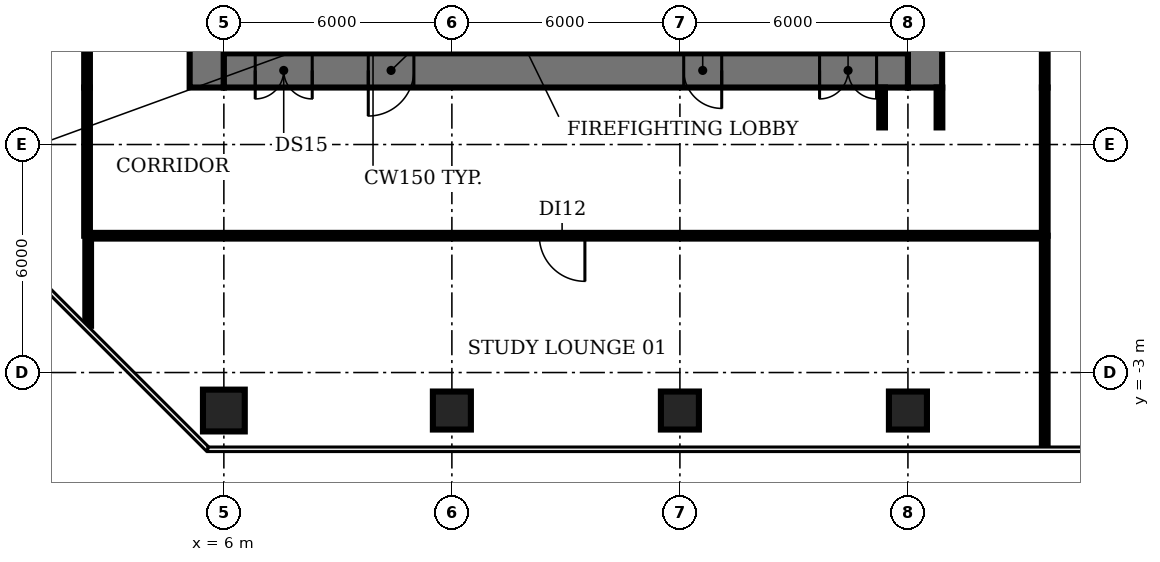
"""IFC4 building model, lengths in metres.
Left out: names, types, materials, properties, quantities, classifications, styles, units other than length and angle.
Written with IfcOpenShell. Run it as: python <this file> out.ifc"""

import sys

from ifc_helpers import new_model, si_unit, direction, frame, frame_2d, origin, origin_2d, place, context, subcontext, project, spatial, rectangle, circle, extrude, element, fill, save


model = new_model("IFC4")
c1 = context("Model", 3, precision=1e-05, world=origin(), true_north=direction((0.0, 1.0)))
c2 = subcontext(c1, "Body", "Model", "MODEL_VIEW")
j1 = project(units=[si_unit("LENGTHUNIT", "METRE"), si_unit("PLANEANGLEUNIT", "RADIAN")], contexts=[c1])
p1 = place(None, origin())
s1 = spatial("IfcSite", under=j1, at=p1, CompositionType="ELEMENT")
p2 = place(p1, origin())
s2 = spatial("IfcBuilding", under=s1, at=p2, CompositionType="ELEMENT")
p3 = place(p2, frame((0.0, 0.0, 24.5)))
s3 = spatial("IfcBuildingStorey", under=s2, at=p3, CompositionType="ELEMENT", Elevation=24.5)
p4 = place(p3, frame((6.0, -4.0, 0.0), z_axis=(0.0, 0.0, 1.0), x_axis=(1.0, 0.0, 0.0)))
e1 = element("IfcColumn", 1, at=p4, inside=s3, PredefinedType="COLUMN", context=c2, shape_type="SweptSolid", body=[
    extrude(circle(Radius=0.55, at=origin_2d()), origin(), (0.0, 0.0, 1.0), 4.15),
])
for number, where, z_axis, x_axis in (
    (2, (12.0, -4.0, 0.0), (0.0, 0.0, 1.0), (1.0, 0.0, 0.0)),
    (3, (18.0, -4.0, 0.0), (0.0, 0.0, 1.0), (1.0, 0.0, 0.0)),
    (4, (24.0, -4.0, 0.0), (0.0, 0.0, 1.0), (1.0, 0.0, 0.0)),
):
    element("IfcColumn", number, at=place(p3, frame(where, z_axis=z_axis, x_axis=x_axis)), inside=s3, PredefinedType="COLUMN", context=c2, shape_type="SweptSolid", body=[
        extrude(rectangle(XDim=1.0, YDim=1.0, at=origin_2d()), origin(), (0.0, 0.0, 1.0), 4.15),
    ])
p5 = place(p3, frame((9.275, 11.825, 0.0), z_axis=(0.0, 0.0, 1.0), x_axis=(0.0, -1.0, 0.0)))
e5 = element("IfcWall", 5, at=p5, inside=s3, PredefinedType="SHEAR", context=c2, shape_type="SweptSolid", body=[
    extrude(rectangle(XDim=6.425, YDim=0.25, at=frame_2d((3.212, 0.0))), origin(), (0.0, 0.0, 1.0), 4.15),
])
p6 = place(p5, frame((5.075, 0.0, 0.0)))
e6 = element("IfcOpeningElement", 6, at=p6, cuts=e5, PredefinedType="OPENING", context=c2, shape_type="SweptSolid", body=[
    extrude(rectangle(XDim=1.0, YDim=2.1, at=frame_2d((0.5, 1.05))), frame((0.0, 0.135, 0.0), z_axis=(0.0, -1.0, 0.0), x_axis=(1.0, 0.0, 0.0)), (0.0, 0.0, 1.0), 0.27),
])
p7 = place(p3, frame((13.5, 5.4, 0.0), z_axis=(0.0, 0.0, 1.0), x_axis=(0.0, 1.0, 0.0)))
e7 = element("IfcWall", 7, at=p7, inside=s3, PredefinedType="SHEAR", context=c2, shape_type="SweptSolid", body=[
    extrude(rectangle(XDim=8.2, YDim=0.2, at=frame_2d((4.1, 0.0))), origin(), (0.0, 0.0, 1.0), 4.15),
])
p8 = place(p7, frame((0.75, 0.0, 0.0)))
e8 = element("IfcOpeningElement", 8, at=p8, cuts=e7, PredefinedType="OPENING", context=c2, shape_type="SweptSolid", body=[
    extrude(rectangle(XDim=1.1, YDim=2.1, at=frame_2d((0.55, 1.05))), frame((0.0, 0.11, 0.0), z_axis=(0.0, -1.0, 0.0), x_axis=(1.0, 0.0, 0.0)), (0.0, 0.0, 1.0), 0.22),
])
p9 = place(p7, frame((3.55, 0.0, 0.0)))
e9 = element("IfcOpeningElement", 9, at=p9, cuts=e7, PredefinedType="OPENING", context=c2, shape_type="SweptSolid", body=[
    extrude(rectangle(XDim=1.1, YDim=2.1, at=frame_2d((0.55, 1.05))), frame((0.0, 0.11, 0.0), z_axis=(0.0, -1.0, 0.0), x_axis=(1.0, 0.0, 0.0)), (0.0, 0.0, 1.0), 0.22),
])
p10 = place(p7, frame((6.35, 0.0, 0.0)))
e10 = element("IfcOpeningElement", 10, at=p10, cuts=e7, PredefinedType="OPENING", context=c2, shape_type="SweptSolid", body=[
    extrude(rectangle(XDim=1.1, YDim=2.1, at=frame_2d((0.55, 1.05))), frame((0.0, 0.11, 0.0), z_axis=(0.0, -1.0, 0.0), x_axis=(1.0, 0.0, 0.0)), (0.0, 0.0, 1.0), 0.22),
])
p11 = place(p3, frame((16.5, 5.4, 0.0), z_axis=(0.0, 0.0, 1.0), x_axis=(0.0, 1.0, 0.0)))
e11 = element("IfcWall", 11, at=p11, inside=s3, PredefinedType="SHEAR", context=c2, shape_type="SweptSolid", body=[
    extrude(rectangle(XDim=8.2, YDim=0.2, at=frame_2d((4.1, 0.0))), origin(), (0.0, 0.0, 1.0), 4.15),
])
p12 = place(p3, frame((20.725, 5.4, 0.0), z_axis=(0.0, 0.0, 1.0), x_axis=(0.0, 1.0, 0.0)))
e12 = element("IfcWall", 12, at=p12, inside=s3, PredefinedType="SHEAR", context=c2, shape_type="SweptSolid", body=[
    extrude(rectangle(XDim=6.3, YDim=0.25, at=frame_2d((3.15, 0.0))), origin(), (0.0, 0.0, 1.0), 4.15),
])
p13 = place(p3, frame((5.55, 4.5, 0.0), z_axis=(0.0, 0.0, 1.0), x_axis=(0.0, 1.0, 0.0)))
e13 = element("IfcWall", 13, at=p13, inside=s3, PredefinedType="SHEAR", context=c2, shape_type="SweptSolid", body=[
    extrude(rectangle(XDim=21.2, YDim=0.9, at=frame_2d((10.6, 0.0))), origin(), (0.0, 0.0, 1.0), 4.15),
])
p14 = place(p13, frame((7.6, 0.0, 0.0)))
e14 = element("IfcOpeningElement", 14, at=p14, cuts=e13, PredefinedType="OPENING", context=c2, shape_type="SweptSolid", body=[
    extrude(rectangle(XDim=1.2, YDim=2.1, at=frame_2d((0.6, 1.05))), frame((0.0, 0.46, 0.0), z_axis=(0.0, -1.0, 0.0), x_axis=(1.0, 0.0, 0.0)), (0.0, 0.0, 1.0), 0.92),
])
p15 = place(p13, frame((14.15, 0.0, 0.0)))
e15 = element("IfcOpeningElement", 15, at=p15, cuts=e13, PredefinedType="OPENING", context=c2, shape_type="SweptSolid", body=[
    extrude(rectangle(XDim=1.2, YDim=2.1, at=frame_2d((0.6, 1.05))), frame((0.0, 0.46, 0.0), z_axis=(0.0, -1.0, 0.0), x_axis=(1.0, 0.0, 0.0)), (0.0, 0.0, 1.0), 0.92),
])
p16 = place(p3, frame((24.45, 25.7, 0.0), z_axis=(0.0, 0.0, 1.0), x_axis=(0.0, -1.0, 0.0)))
e16 = element("IfcWall", 16, at=p16, inside=s3, PredefinedType="SHEAR", context=c2, shape_type="SweptSolid", body=[
    extrude(rectangle(XDim=21.2, YDim=0.9, at=frame_2d((10.6, 0.0))), origin(), (0.0, 0.0, 1.0), 4.15),
])
p17 = place(p16, frame((12.45, 0.0, 0.0)))
e17 = element("IfcOpeningElement", 17, at=p17, cuts=e16, PredefinedType="OPENING", context=c2, shape_type="SweptSolid", body=[
    extrude(rectangle(XDim=0.9, YDim=2.1, at=frame_2d((0.45, 1.05))), frame((0.0, 0.46, 0.0), z_axis=(0.0, -1.0, 0.0), x_axis=(1.0, 0.0, 0.0)), (0.0, 0.0, 1.0), 0.92),
])
p18 = place(p16, frame((6.45, 0.0, 0.0)))
e18 = element("IfcOpeningElement", 18, at=p18, cuts=e16, PredefinedType="OPENING", context=c2, shape_type="SweptSolid", body=[
    extrude(rectangle(XDim=2.0, YDim=2.1, at=frame_2d((1.0, 1.05))), frame((0.0, 0.46, 0.0), z_axis=(0.0, -1.0, 0.0), x_axis=(1.0, 0.0, 0.0)), (0.0, 0.0, 1.0), 0.92),
])
p19 = place(p3, frame((24.0, 4.95, 0.0), z_axis=(0.0, 0.0, 1.0), x_axis=(-1.0, 0.0, 0.0)))
e19 = element("IfcWall", 19, at=p19, inside=s3, PredefinedType="SHEAR", context=c2, shape_type="SweptSolid", body=[
    extrude(rectangle(XDim=18.0, YDim=0.9, at=frame_2d((9.0, 0.0))), origin(), (0.0, 0.0, 1.0), 4.15),
])
p20 = place(p19, frame((15.675, 0.0, 0.0)))
e20 = element("IfcOpeningElement", 20, at=p20, cuts=e19, PredefinedType="OPENING", context=c2, shape_type="SweptSolid", body=[
    extrude(rectangle(XDim=1.5, YDim=2.1, at=frame_2d((0.75, 1.05))), frame((0.0, 0.46, 0.0), z_axis=(0.0, -1.0, 0.0), x_axis=(1.0, 0.0, 0.0)), (0.0, 0.0, 1.0), 0.92),
])
p21 = place(p19, frame((0.825, 0.0, 0.0)))
e21 = element("IfcOpeningElement", 21, at=p21, cuts=e19, PredefinedType="OPENING", context=c2, shape_type="SweptSolid", body=[
    extrude(rectangle(XDim=1.5, YDim=2.1, at=frame_2d((0.75, 1.05))), frame((0.0, 0.46, 0.0), z_axis=(0.0, -1.0, 0.0), x_axis=(1.0, 0.0, 0.0)), (0.0, 0.0, 1.0), 0.92),
])
p22 = place(p19, frame((13.0, 0.0, 0.0)))
e22 = element("IfcOpeningElement", 22, at=p22, cuts=e19, PredefinedType="OPENING", context=c2, shape_type="SweptSolid", body=[
    extrude(rectangle(XDim=1.2, YDim=2.1, at=frame_2d((0.6, 1.05))), frame((0.0, 0.46, 0.0), z_axis=(0.0, -1.0, 0.0), x_axis=(1.0, 0.0, 0.0)), (0.0, 0.0, 1.0), 0.92),
])
p23 = place(p19, frame((4.9, 0.0, 0.0)))
e23 = element("IfcOpeningElement", 23, at=p23, cuts=e19, PredefinedType="OPENING", context=c2, shape_type="SweptSolid", body=[
    extrude(rectangle(XDim=1.0, YDim=2.1, at=frame_2d((0.5, 1.05))), frame((0.0, 0.46, 0.0), z_axis=(0.0, -1.0, 0.0), x_axis=(1.0, 0.0, 0.0)), (0.0, 0.0, 1.0), 0.92),
])
p24 = place(p3, frame((2.4, 0.6, 0.0), z_axis=(0.0, 0.0, 1.0), x_axis=(0.0, 1.0, 0.0)))
e24 = element("IfcWall", 24, at=p24, inside=s3, PredefinedType="PARTITIONING", context=c2, shape_type="SweptSolid", body=[
    extrude(rectangle(XDim=3.9, YDim=0.15, at=frame_2d((1.95, 0.0))), origin(), (0.0, 0.0, 1.0), 3.08),
])
p25 = place(p3, frame((2.4, 4.5, 0.0), z_axis=(0.0, 0.0, 1.0), x_axis=(0.0, 1.0, 0.0)))
e25 = element("IfcWall", 25, at=p25, inside=s3, PredefinedType="PARTITIONING", context=c2, shape_type="SweptSolid", body=[
    extrude(rectangle(XDim=21.2, YDim=0.15, at=frame_2d((10.6, 0.0))), origin(), (0.0, 0.0, 1.0), 3.08),
])
p26 = place(p25, frame((10.8, 0.0, 0.0)))
e26 = element("IfcOpeningElement", 26, at=p26, cuts=e25, PredefinedType="OPENING", context=c2, shape_type="SweptSolid", body=[
    extrude(rectangle(XDim=1.2, YDim=2.1, at=frame_2d((0.6, 1.05))), frame((0.0, 0.085, 0.0), z_axis=(0.0, -1.0, 0.0), x_axis=(1.0, 0.0, 0.0)), (0.0, 0.0, 1.0), 0.17),
])
p27 = place(p3, frame((2.43, -1.77, 0.0), z_axis=(0.0, 0.0, 1.0), x_axis=(0.0, 1.0, 0.0)))
e27 = element("IfcWall", 27, at=p27, inside=s3, PredefinedType="PARTITIONING", context=c2, shape_type="SweptSolid", body=[
    extrude(rectangle(XDim=2.37, YDim=0.15, at=frame_2d((1.185, 0.0))), origin(), (0.0, 0.0, 1.0), 3.08),
])
for number, where, z_axis, x_axis in (
    (28, (23.32, 3.45, 0.0), (0.0, 0.0, 1.0), (0.0, 1.0, 0.0)),
    (29, (24.83, 3.45, 0.0), (0.0, 0.0, 1.0), (0.0, 1.0, 0.0)),
):
    element("IfcWall", number, at=place(p3, frame(where, z_axis=z_axis, x_axis=x_axis)), inside=s3, PredefinedType="PARTITIONING", context=c2, shape_type="SweptSolid", body=[
        extrude(rectangle(XDim=1.05, YDim=0.15, at=frame_2d((0.525, 0.0))), origin(), (0.0, 0.0, 1.0), 3.08),
    ])
p28 = place(p3, frame((27.6, -4.97, 0.0), z_axis=(0.0, 0.0, 1.0), x_axis=(0.0, 1.0, 0.0)))
e30 = element("IfcWall", 30, at=p28, inside=s3, PredefinedType="PARTITIONING", context=c2, shape_type="SweptSolid", body=[
    extrude(rectangle(XDim=5.57, YDim=0.15, at=frame_2d((2.785, 0.0))), origin(), (0.0, 0.0, 1.0), 3.08),
])
p29 = place(p3, frame((27.6, 0.6, 0.0), z_axis=(0.0, 0.0, 1.0), x_axis=(-1.0, 0.0, 0.0)))
e31 = element("IfcWall", 31, at=p29, inside=s3, PredefinedType="PARTITIONING", context=c2, shape_type="SweptSolid", body=[
    extrude(rectangle(XDim=25.2, YDim=0.15, at=frame_2d((12.6, 0.0))), origin(), (0.0, 0.0, 1.0), 3.08),
])
p30 = place(p29, frame((12.1, 0.0, 0.0)))
e32 = element("IfcOpeningElement", 32, at=p30, cuts=e31, PredefinedType="OPENING", context=c2, shape_type="SweptSolid", body=[
    extrude(rectangle(XDim=1.2, YDim=2.1, at=frame_2d((0.6, 1.05))), frame((0.0, 0.085, 0.0), z_axis=(0.0, -1.0, 0.0), x_axis=(1.0, 0.0, 0.0)), (0.0, 0.0, 1.0), 0.17),
])
p31 = place(p3, frame((27.6, 0.6, 0.0), z_axis=(0.0, 0.0, 1.0), x_axis=(0.0, 1.0, 0.0)))
e33 = element("IfcWall", 33, at=p31, inside=s3, PredefinedType="PARTITIONING", context=c2, shape_type="SweptSolid", body=[
    extrude(rectangle(XDim=3.9, YDim=0.15, at=frame_2d((1.95, 0.0))), origin(), (0.0, 0.0, 1.0), 3.08),
])
p32 = place(p3, frame((27.6, 23.77, 0.0), z_axis=(0.0, 0.0, 1.0), x_axis=(0.0, -1.0, 0.0)))
e34 = element("IfcWall", 34, at=p32, inside=s3, PredefinedType="PARTITIONING", context=c2, shape_type="SweptSolid", body=[
    extrude(rectangle(XDim=19.27, YDim=0.15, at=frame_2d((9.635, 0.0))), origin(), (0.0, 0.0, 1.0), 3.08),
])
p33 = place(p32, frame((9.07, 0.0, 0.0)))
e35 = element("IfcOpeningElement", 35, at=p33, cuts=e34, PredefinedType="OPENING", context=c2, shape_type="SweptSolid", body=[
    extrude(rectangle(XDim=1.0, YDim=2.1, at=frame_2d((0.5, 1.05))), frame((0.0, 0.085, 0.0), z_axis=(0.0, -1.0, 0.0), x_axis=(1.0, 0.0, 0.0)), (0.0, 0.0, 1.0), 0.17),
])
p34 = place(p20, origin())
e36 = element("IfcDoor", 36, at=p34, inside=s3, OperationType="DOUBLE_DOOR_SINGLE_SWING", PredefinedType="DOOR", context=c2, shape_type="SweptSolid", body=[
    extrude(rectangle(XDim=1.5, YDim=2.1, at=frame_2d((0.75, 1.05))), frame((0.0, 0.025, 0.0), z_axis=(0.0, -1.0, 0.0), x_axis=(1.0, 0.0, 0.0)), (0.0, 0.0, 1.0), 0.05),
])
fill(e20, e36)
p35 = place(p21, origin())
e37 = element("IfcDoor", 37, at=p35, inside=s3, OperationType="DOUBLE_DOOR_SINGLE_SWING", PredefinedType="DOOR", context=c2, shape_type="SweptSolid", body=[
    extrude(rectangle(XDim=1.5, YDim=2.1, at=frame_2d((0.75, 1.05))), frame((0.0, 0.025, 0.0), z_axis=(0.0, -1.0, 0.0), x_axis=(1.0, 0.0, 0.0)), (0.0, 0.0, 1.0), 0.05),
])
fill(e21, e37)
p36 = place(p22, origin())
e38 = element("IfcDoor", 38, at=p36, inside=s3, OperationType="SINGLE_SWING_RIGHT", PredefinedType="DOOR", context=c2, shape_type="SweptSolid", body=[
    extrude(rectangle(XDim=1.2, YDim=2.1, at=frame_2d((0.6, 1.05))), frame((0.0, 0.025, 0.0), z_axis=(0.0, -1.0, 0.0), x_axis=(1.0, 0.0, 0.0)), (0.0, 0.0, 1.0), 0.05),
])
fill(e22, e38)
p37 = place(p23, origin())
e39 = element("IfcDoor", 39, at=p37, inside=s3, OperationType="SINGLE_SWING_LEFT", PredefinedType="DOOR", context=c2, shape_type="SweptSolid", body=[
    extrude(rectangle(XDim=1.0, YDim=2.1, at=frame_2d((0.5, 1.05))), frame((0.0, -0.39, 0.0), z_axis=(0.0, -1.0, 0.0), x_axis=(1.0, 0.0, 0.0)), (0.0, 0.0, 1.0), 0.05),
])
fill(e23, e39)
p38 = place(p30, origin())
e40 = element("IfcDoor", 40, at=p38, inside=s3, OperationType="SINGLE_SWING_LEFT", PredefinedType="DOOR", context=c2, shape_type="SweptSolid", body=[
    extrude(rectangle(XDim=1.2, YDim=2.1, at=frame_2d((0.6, 1.05))), frame((0.0, 0.025, 0.0), z_axis=(0.0, -1.0, 0.0), x_axis=(1.0, 0.0, 0.0)), (0.0, 0.0, 1.0), 0.05),
])
fill(e32, e40)
save(model, sys.argv[1])
